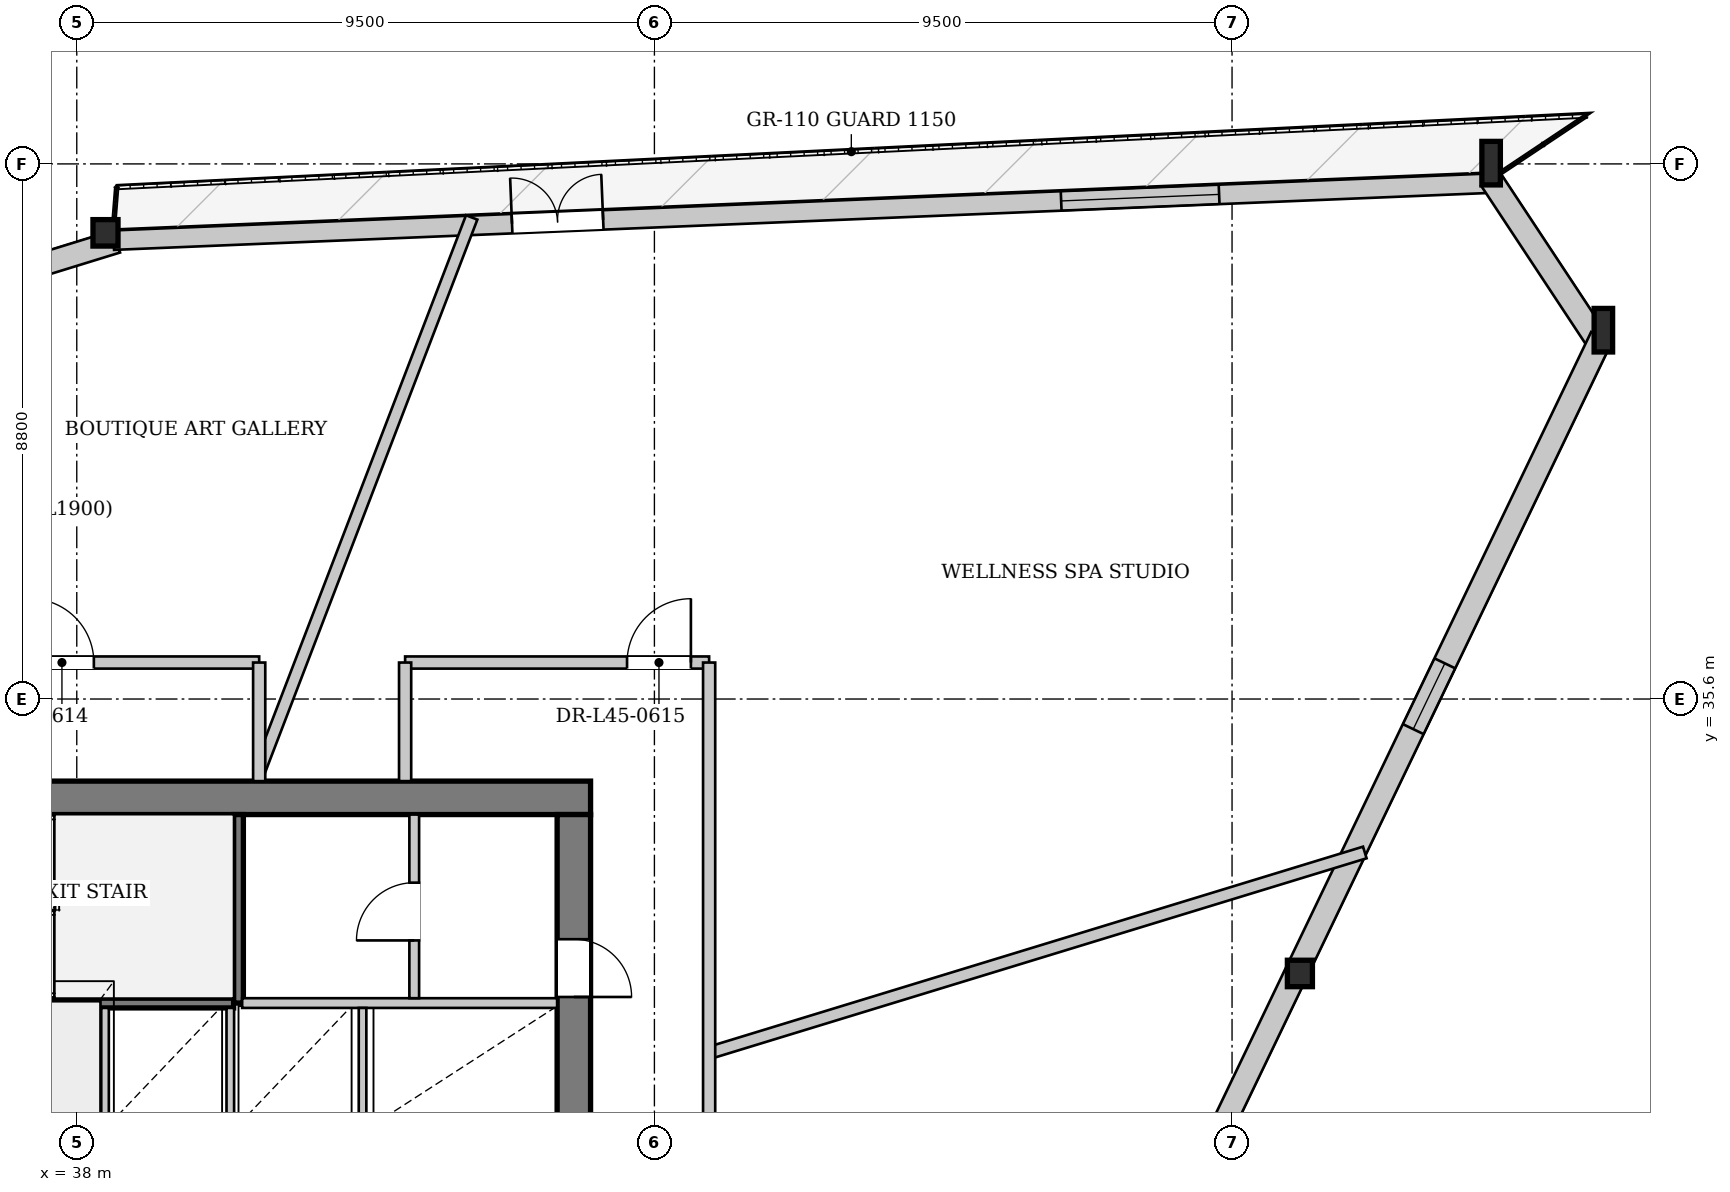
"""IFC4 building model, lengths in metres.
Left out: names, types, materials, properties, quantities, classifications, styles, units other than length and angle.
Written with IfcOpenShell. Run it as: python <this file> out.ifc"""

import sys

from ifc_helpers import new_model, si_unit, direction, frame, frame_2d, origin, origin_2d, place, context, subcontext, project, spatial, rectangle, i_section, extrude, source, transform, mapped, element, fill, save


model = new_model("IFC4")
c1 = context("Model", 3, precision=1e-05, world=origin(), true_north=direction((0.0, 1.0)))
c2 = subcontext(c1, "Body", "Model", "MODEL_VIEW")
j1 = project(units=[si_unit("LENGTHUNIT", "METRE"), si_unit("PLANEANGLEUNIT", "RADIAN")], contexts=[c1])
p1 = place(None, origin())
s1 = spatial("IfcSite", under=j1, at=p1, CompositionType="ELEMENT")
p2 = place(p1, origin())
s2 = spatial("IfcBuilding", under=s1, at=p2, CompositionType="ELEMENT")
p3 = place(p2, frame((0.0, 0.0, 171.45)))
s3 = spatial("IfcBuildingStorey", under=s2, at=p3, CompositionType="ELEMENT", Elevation=171.45)
m1 = source(origin(), c2, "Body", "SweptSolid", [
    extrude(i_section(OverallWidth=0.304, OverallDepth=0.716, WebThickness=0.021, FlangeThickness=0.04, at=origin_2d()), origin(), (0.0, 0.0, 1.0), 3.419),
])
p4 = place(p3, frame((63.249, 41.473, 0.0), z_axis=(-0.082983372602, 0.112691705651, 0.99015874452), x_axis=(-0.805235363414, -0.592955318306, 0.0)))
e1 = element("IfcColumn", 1, at=p4, inside=s3, PredefinedType="COLUMN", context=c2, shape_type="MappedRepresentation", body=[
    mapped(m1, transform((0.0, 0.0, 0.0), x_axis=(1.0, 0.0, 0.0), y_axis=(0.0, 1.0, 0.0), z_axis=(0.0, 0.0, 1.0), scale=1.0)),
])
m2 = source(origin(), c2, "Body", "SweptSolid", [
    extrude(i_section(OverallWidth=0.304, OverallDepth=0.716, WebThickness=0.021, FlangeThickness=0.04, at=origin_2d()), origin(), (0.0, 0.0, 1.0), 3.414),
])
p5 = place(p3, frame((61.414, 44.25, 0.0), z_axis=(-0.089455445649, 0.095033003411, 0.991446645819), x_axis=(-0.728151735963, -0.685415968164, 0.0)))
e2 = element("IfcColumn", 2, at=p5, inside=s3, PredefinedType="COLUMN", context=c2, shape_type="MappedRepresentation", body=[
    mapped(m2, transform((0.0, 0.0, 0.0), x_axis=(1.0, 0.0, 0.0), y_axis=(0.0, 1.0, 0.0), z_axis=(0.0, 0.0, 1.0), scale=1.0)),
])
m3 = source(origin(), c2, "Body", "SweptSolid", [
    extrude(i_section(OverallWidth=0.412, OverallDepth=0.435, WebThickness=0.031, FlangeThickness=0.05, at=origin_2d()), origin(), (0.0, 0.0, 1.0), 3.396),
])
p6 = place(p3, frame((38.6, 43.306, 0.0), z_axis=(-0.075279188452, -0.023223665587, 0.99689202281), x_axis=(0.29479123516, -0.955561681773, 0.0)))
e3 = element("IfcColumn", 3, at=p6, inside=s3, PredefinedType="COLUMN", context=c2, shape_type="MappedRepresentation", body=[
    mapped(m3, transform((0.0, 0.0, 0.0), x_axis=(1.0, 0.0, 0.0), y_axis=(0.0, 1.0, 0.0), z_axis=(0.0, 0.0, 1.0), scale=1.0)),
])
m4 = source(origin(), c2, "Body", "SweptSolid", [
    extrude(i_section(OverallWidth=0.412, OverallDepth=0.435, WebThickness=0.031, FlangeThickness=0.05, at=origin_2d()), origin(), (0.0, 0.0, 1.0), 3.404),
])
p7 = place(p3, frame((58.182, 30.921, 0.0), z_axis=(-0.038804856025, 0.0971914601, 0.994508925668), x_axis=(-0.928712846652, -0.370799741726, 0.0)))
e4 = element("IfcColumn", 4, at=p7, inside=s3, PredefinedType="COLUMN", context=c2, shape_type="MappedRepresentation", body=[
    mapped(m4, transform((0.0, 0.0, 0.0), x_axis=(1.0, 0.0, 0.0), y_axis=(0.0, 1.0, 0.0), z_axis=(0.0, 0.0, 1.0), scale=1.0)),
])
p8 = place(p3, frame((16.837, 36.396, 0.0), z_axis=(0.0, 0.0, 1.0), x_axis=(0.955604756782, 0.294651571887, 0.0)))
e5 = element("IfcWall", 5, at=p8, inside=s3, PredefinedType="SOLIDWALL", context=c2, shape_type="SweptSolid", body=[
    extrude(rectangle(XDim=22.833, YDim=0.38, at=frame_2d((11.417, 0.0))), origin(), (0.0, 0.0, 1.0), 2.722),
])
p9 = place(p8, frame((5.793, 0.0, 0.65)))
e6 = element("IfcOpeningElement", 6, at=p9, cuts=e5, PredefinedType="OPENING", context=c2, shape_type="SweptSolid", body=[
    extrude(rectangle(XDim=1.2, YDim=1.5, at=frame_2d((0.6, 0.75))), frame((0.0, 0.2, 0.0), z_axis=(0.0, -1.0, 0.0), x_axis=(1.0, 0.0, 0.0)), (0.0, 0.0, 1.0), 0.4),
])
p10 = place(p8, frame((16.59, 0.0, 0.65)))
e7 = element("IfcOpeningElement", 7, at=p10, cuts=e5, PredefinedType="OPENING", context=c2, shape_type="SweptSolid", body=[
    extrude(rectangle(XDim=1.2, YDim=1.5, at=frame_2d((0.6, 0.75))), frame((0.0, 0.2, 0.0), z_axis=(0.0, -1.0, 0.0), x_axis=(1.0, 0.0, 0.0)), (0.0, 0.0, 1.0), 0.4),
])
p11 = place(p3, frame((38.607, 43.146, 0.0), z_axis=(0.0, 0.0, 1.0), x_axis=(0.999144377046, 0.041358358487, 0.0)))
e8 = element("IfcWall", 8, at=p11, inside=s3, PredefinedType="SOLIDWALL", context=c2, shape_type="SweptSolid", body=[
    extrude(rectangle(XDim=22.833, YDim=0.32, at=frame_2d((11.417, 0.0))), origin(), (0.0, 0.0, 1.0), 2.722),
])
p12 = place(p11, frame((6.557, 0.0, 0.0)))
e9 = element("IfcOpeningElement", 9, at=p12, cuts=e8, PredefinedType="OPENING", context=c2, shape_type="SweptSolid", body=[
    extrude(rectangle(XDim=1.5, YDim=2.3, at=frame_2d((0.75, 1.15))), frame((0.0, 0.17, 0.0), z_axis=(0.0, -1.0, 0.0), x_axis=(1.0, 0.0, 0.0)), (0.0, 0.0, 1.0), 0.34),
])
p13 = place(p11, frame((15.596, 0.0, 0.252)))
e10 = element("IfcOpeningElement", 10, at=p13, cuts=e8, PredefinedType="OPENING", context=c2, shape_type="SweptSolid", body=[
    extrude(rectangle(XDim=2.6, YDim=2.35, at=frame_2d((1.3, 1.175))), frame((0.0, 0.17, 0.0), z_axis=(0.0, -1.0, 0.0), x_axis=(1.0, 0.0, 0.0)), (0.0, 0.0, 1.0), 0.34),
])
p14 = place(p3, frame((61.255, 44.146, 0.0), z_axis=(0.0, 0.0, 1.0), x_axis=(0.551208947665, -0.834367242894, 0.0)))
e11 = element("IfcWall", 11, at=p14, inside=s3, PredefinedType="SOLIDWALL", context=c2, shape_type="SweptSolid", body=[
    extrude(rectangle(XDim=3.329, YDim=0.38, at=frame_2d((1.665, 0.0))), origin(), (0.0, 0.0, 1.0), 2.722),
])
p15 = place(p3, frame((63.077, 41.555, 0.0), z_axis=(0.0, 0.0, 1.0), x_axis=(-0.432876854569, -0.901453065211, 0.0)))
e12 = element("IfcWall", 12, at=p15, inside=s3, PredefinedType="SOLIDWALL", context=c2, shape_type="SweptSolid", body=[
    extrude(rectangle(XDim=23.409, YDim=0.38, at=frame_2d((11.705, 0.0))), origin(), (0.0, 0.0, 1.0), 2.722),
])
p16 = place(p15, frame((5.955, 0.0, 0.65)))
e13 = element("IfcOpeningElement", 13, at=p16, cuts=e12, PredefinedType="OPENING", context=c2, shape_type="SweptSolid", body=[
    extrude(rectangle(XDim=1.2, YDim=1.5, at=frame_2d((0.6, 0.75))), frame((0.0, 0.2, 0.0), z_axis=(0.0, -1.0, 0.0), x_axis=(1.0, 0.0, 0.0)), (0.0, 0.0, 1.0), 0.4),
])
p17 = place(p15, frame((16.255, 0.0, 0.65)))
e14 = element("IfcOpeningElement", 14, at=p17, cuts=e12, PredefinedType="OPENING", context=c2, shape_type="SweptSolid", body=[
    extrude(rectangle(XDim=1.2, YDim=1.5, at=frame_2d((0.6, 0.75))), frame((0.0, 0.2, 0.0), z_axis=(0.0, -1.0, 0.0), x_axis=(1.0, 0.0, 0.0)), (0.0, 0.0, 1.0), 0.4),
])
p18 = place(p3, frame((29.55, 33.975, 0.0), z_axis=(0.0, 0.0, 1.0), x_axis=(1.0, 0.0, 0.0)))
e15 = element("IfcWall", 15, at=p18, inside=s3, PredefinedType="SHEAR", context=c2, shape_type="SweptSolid", body=[
    extrude(rectangle(XDim=16.9, YDim=0.55, at=frame_2d((8.45, 0.0))), origin(), (0.0, 0.0, 1.0), 3.33),
])
p19 = place(p18, frame((1.55, 0.0, 0.0)))
e16 = element("IfcOpeningElement", 16, at=p19, cuts=e15, PredefinedType="OPENING", context=c2, shape_type="SweptSolid", body=[
    extrude(rectangle(XDim=0.95, YDim=2.1, at=frame_2d((0.475, 1.05))), frame((0.0, 0.285, 0.0), z_axis=(0.0, -1.0, 0.0), x_axis=(1.0, 0.0, 0.0)), (0.0, 0.0, 1.0), 0.57),
])
p20 = place(p18, frame((3.93, 0.0, 0.0)))
e17 = element("IfcOpeningElement", 17, at=p20, cuts=e15, PredefinedType="OPENING", context=c2, shape_type="SweptSolid", body=[
    extrude(rectangle(XDim=1.32, YDim=2.2, at=frame_2d((0.66, 1.1))), frame((0.0, 0.285, 0.0), z_axis=(0.0, -1.0, 0.0), x_axis=(1.0, 0.0, 0.0)), (0.0, 0.0, 1.0), 0.57),
])
p21 = place(p3, frame((46.175, 33.7, 0.0), z_axis=(0.0, 0.0, 1.0), x_axis=(0.0, -1.0, 0.0)))
e18 = element("IfcWall", 18, at=p21, inside=s3, PredefinedType="SHEAR", context=c2, shape_type="SweptSolid", body=[
    extrude(rectangle(XDim=14.2, YDim=0.55, at=frame_2d((7.1, 0.0))), origin(), (0.0, 0.0, 1.0), 3.33),
])
p22 = place(p21, frame((5.18, 0.0, 0.0)))
e19 = element("IfcOpeningElement", 19, at=p22, cuts=e18, PredefinedType="OPENING", context=c2, shape_type="SweptSolid", body=[
    extrude(rectangle(XDim=1.6, YDim=2.2, at=frame_2d((0.8, 1.1))), frame((0.0, 0.285, 0.0), z_axis=(0.0, -1.0, 0.0), x_axis=(1.0, 0.0, 0.0)), (0.0, 0.0, 1.0), 0.57),
])
p23 = place(p21, frame((2.05, 0.0, 0.0)))
e20 = element("IfcOpeningElement", 20, at=p23, cuts=e18, PredefinedType="OPENING", context=c2, shape_type="SweptSolid", body=[
    extrude(rectangle(XDim=0.95, YDim=2.1, at=frame_2d((0.475, 1.05))), frame((0.0, 0.285, 0.0), z_axis=(0.0, -1.0, 0.0), x_axis=(1.0, 0.0, 0.0)), (0.0, 0.0, 1.0), 0.57),
])
p24 = place(p3, frame((33.28, 30.6, 0.0), z_axis=(0.0, 0.0, 1.0), x_axis=(1.0, 0.0, 0.0)))
e21 = element("IfcWall", 21, at=p24, inside=s3, PredefinedType="PARTITIONING", context=c2, shape_type="SweptSolid", body=[
    extrude(rectangle(XDim=7.3, YDim=0.16, at=frame_2d((3.65, 0.0))), origin(), (0.0, 0.0, 1.0), 3.33),
])
p25 = place(p3, frame((40.66, 30.6, 0.0), z_axis=(0.0, 0.0, 1.0), x_axis=(0.0, 1.0, 0.0)))
e22 = element("IfcWall", 22, at=p25, inside=s3, PredefinedType="PARTITIONING", context=c2, shape_type="SweptSolid", body=[
    extrude(rectangle(XDim=3.1, YDim=0.16, at=frame_2d((1.55, 0.0))), origin(), (0.0, 0.0, 1.0), 3.33),
])
p26 = place(p3, frame((40.72, 30.6, 0.0), z_axis=(0.0, 0.0, 1.0), x_axis=(1.0, 0.0, 0.0)))
e23 = element("IfcWall", 23, at=p26, inside=s3, PredefinedType="PARTITIONING", context=c2, shape_type="SweptSolid", body=[
    extrude(rectangle(XDim=5.18, YDim=0.16, at=frame_2d((2.59, 0.0))), origin(), (0.0, 0.0, 1.0), 3.33),
])
for number, where, z_axis, x_axis in (
    (24, (38.465, 28.6, 0.0), (0.0, 0.0, 1.0), (0.0, 1.0, 0.0)),
    (25, (40.525, 28.6, 0.0), (0.0, 0.0, 1.0), (0.0, 1.0, 0.0)),
    (26, (42.7, 28.6, 0.0), (0.0, 0.0, 1.0), (0.0, 1.0, 0.0)),
):
    element("IfcWall", number, at=place(p3, frame(where, z_axis=z_axis, x_axis=x_axis)), inside=s3, PredefinedType="PARTITIONING", context=c2, shape_type="SweptSolid", body=[
        extrude(rectangle(XDim=1.92, YDim=0.125, at=frame_2d((0.96, 0.0))), origin(), (0.0, 0.0, 1.0), 3.33),
    ])
p27 = place(p3, frame((43.55, 30.68, 0.0), z_axis=(0.0, 0.0, 1.0), x_axis=(0.0, 1.0, 0.0)))
e27 = element("IfcWall", 27, at=p27, inside=s3, PredefinedType="PARTITIONING", context=c2, shape_type="SweptSolid", body=[
    extrude(rectangle(XDim=3.02, YDim=0.16, at=frame_2d((1.51, 0.0))), origin(), (0.0, 0.0, 1.0), 3.33),
])
p28 = place(p27, frame((0.95, 0.0, 0.0)))
e28 = element("IfcOpeningElement", 28, at=p28, cuts=e27, PredefinedType="OPENING", context=c2, shape_type="SweptSolid", body=[
    extrude(rectangle(XDim=0.95, YDim=2.1, at=frame_2d((0.475, 1.05))), frame((0.0, 0.09, 0.0), z_axis=(0.0, -1.0, 0.0), x_axis=(1.0, 0.0, 0.0)), (0.0, 0.0, 1.0), 0.18),
])
p29 = place(p3, frame((48.4, 29.78, 0.0), z_axis=(0.0, 0.0, 1.0), x_axis=(0.956305507795, 0.29236924558, 0.0)))
e29 = element("IfcWall", 29, at=p29, inside=s3, PredefinedType="PARTITIONING", context=c2, shape_type="SweptSolid", body=[
    extrude(rectangle(XDim=11.276, YDim=0.2, at=frame_2d((5.638, 0.0))), origin(), (0.0, 0.0, 1.0), 3.33),
])
p30 = place(p3, frame((41.0, 34.415, 0.0), z_axis=(0.0, 0.0, 1.0), x_axis=(0.358366692875, 0.933580908887, 0.0)))
e30 = element("IfcWall", 30, at=p30, inside=s3, PredefinedType="PARTITIONING", context=c2, shape_type="SweptSolid", body=[
    extrude(rectangle(XDim=9.752, YDim=0.2, at=frame_2d((4.876, 0.0))), origin(), (0.0, 0.0, 1.0), 3.33),
])
p31 = place(p3, frame((27.6, 36.2, 0.0), z_axis=(0.0, 0.0, 1.0), x_axis=(1.0, 0.0, 0.0)))
e31 = element("IfcWall", 31, at=p31, inside=s3, PredefinedType="PARTITIONING", context=c2, shape_type="SweptSolid", body=[
    extrude(rectangle(XDim=13.4, YDim=0.2, at=frame_2d((6.7, 0.0))), origin(), (0.0, 0.0, 1.0), 3.33),
])
p32 = place(p31, frame((9.631, 0.0, 0.0)))
e32 = element("IfcOpeningElement", 32, at=p32, cuts=e31, PredefinedType="OPENING", context=c2, shape_type="SweptSolid", body=[
    extrude(rectangle(XDim=1.05, YDim=2.2, at=frame_2d((0.525, 1.1))), frame((0.0, 0.11, 0.0), z_axis=(0.0, -1.0, 0.0), x_axis=(1.0, 0.0, 0.0)), (0.0, 0.0, 1.0), 0.22),
])
p33 = place(p3, frame((41.0, 34.25, 0.0), z_axis=(0.0, 0.0, 1.0), x_axis=(0.0, 1.0, 0.0)))
e33 = element("IfcWall", 33, at=p33, inside=s3, PredefinedType="PARTITIONING", context=c2, shape_type="SweptSolid", body=[
    extrude(rectangle(XDim=1.95, YDim=0.2, at=frame_2d((0.975, 0.0))), origin(), (0.0, 0.0, 1.0), 3.33),
])
p34 = place(p3, frame((43.4, 36.2, 0.0), z_axis=(0.0, 0.0, 1.0), x_axis=(1.0, 0.0, 0.0)))
e34 = element("IfcWall", 34, at=p34, inside=s3, PredefinedType="PARTITIONING", context=c2, shape_type="SweptSolid", body=[
    extrude(rectangle(XDim=5.0, YDim=0.2, at=frame_2d((2.5, 0.0))), origin(), (0.0, 0.0, 1.0), 3.33),
])
p35 = place(p34, frame((3.65, 0.0, 0.0)))
e35 = element("IfcOpeningElement", 35, at=p35, cuts=e34, PredefinedType="OPENING", context=c2, shape_type="SweptSolid", body=[
    extrude(rectangle(XDim=1.05, YDim=2.2, at=frame_2d((0.525, 1.1))), frame((0.0, 0.11, 0.0), z_axis=(0.0, -1.0, 0.0), x_axis=(1.0, 0.0, 0.0)), (0.0, 0.0, 1.0), 0.22),
])
p36 = place(p3, frame((43.4, 34.25, 0.0), z_axis=(0.0, 0.0, 1.0), x_axis=(0.0, 1.0, 0.0)))
e36 = element("IfcWall", 36, at=p36, inside=s3, PredefinedType="PARTITIONING", context=c2, shape_type="SweptSolid", body=[
    extrude(rectangle(XDim=1.95, YDim=0.2, at=frame_2d((0.975, 0.0))), origin(), (0.0, 0.0, 1.0), 3.33),
])
p37 = place(p3, frame((48.4, 17.0, 0.0), z_axis=(0.0, 0.0, 1.0), x_axis=(0.0, 1.0, 0.0)))
e37 = element("IfcWall", 37, at=p37, inside=s3, PredefinedType="PARTITIONING", context=c2, shape_type="SweptSolid", body=[
    extrude(rectangle(XDim=19.2, YDim=0.2, at=frame_2d((9.6, 0.0))), origin(), (0.0, 0.0, 1.0), 3.33),
])
p38 = place(p37, frame((8.665, 0.0, 0.0)))
e38 = element("IfcOpeningElement", 38, at=p38, cuts=e37, PredefinedType="OPENING", context=c2, shape_type="SweptSolid", body=[
    extrude(rectangle(XDim=1.05, YDim=2.2, at=frame_2d((0.525, 1.1))), frame((0.0, 0.11, 0.0), z_axis=(0.0, -1.0, 0.0), x_axis=(1.0, 0.0, 0.0)), (0.0, 0.0, 1.0), 0.22),
])
m5 = source(origin(), c2, "Body", "SweptSolid", [
    extrude(rectangle(XDim=1.5, YDim=2.3, at=frame_2d((0.75, 1.15))), frame((0.0, 0.025, 0.0), z_axis=(0.0, -1.0, 0.0), x_axis=(1.0, 0.0, 0.0)), (0.0, 0.0, 1.0), 0.05),
])
p39 = place(p12, origin())
e39 = element("IfcDoor", 39, at=p39, inside=s3, OperationType="DOUBLE_DOOR_SINGLE_SWING", PredefinedType="DOOR", context=c2, shape_type="MappedRepresentation", body=[
    mapped(m5, transform((0.0, 0.0, 0.0), x_axis=(1.0, 0.0, 0.0), y_axis=(0.0, 1.0, 0.0), z_axis=(0.0, 0.0, 1.0), scale=1.0)),
])
fill(e9, e39)
m6 = source(origin(), c2, "Body", "SweptSolid", [
    extrude(rectangle(XDim=2.6, YDim=2.35, at=frame_2d((1.3, 1.175))), frame((0.0, 0.03, 0.0), z_axis=(0.0, -1.0, 0.0), x_axis=(1.0, 0.0, 0.0)), (0.0, 0.0, 1.0), 0.06),
])
p40 = place(p13, origin())
e40 = element("IfcWindow", 40, at=p40, inside=s3, PartitioningType="SINGLE_PANEL", PredefinedType="WINDOW", context=c2, shape_type="MappedRepresentation", body=[
    mapped(m6, transform((0.0, 0.0, 0.0), x_axis=(1.0, 0.0, 0.0), y_axis=(0.0, 1.0, 0.0), z_axis=(0.0, 0.0, 1.0), scale=1.0)),
])
fill(e10, e40)
m7 = source(origin(), c2, "Body", "SweptSolid", [
    extrude(rectangle(XDim=1.2, YDim=1.5, at=frame_2d((0.6, 0.75))), frame((0.0, 0.03, 0.0), z_axis=(0.0, -1.0, 0.0), x_axis=(1.0, 0.0, 0.0)), (0.0, 0.0, 1.0), 0.06),
])
p41 = place(p16, origin())
e41 = element("IfcWindow", 41, at=p41, inside=s3, PartitioningType="SINGLE_PANEL", PredefinedType="WINDOW", context=c2, shape_type="MappedRepresentation", body=[
    mapped(m7, transform((0.0, 0.0, 0.0), x_axis=(1.0, 0.0, 0.0), y_axis=(0.0, 1.0, 0.0), z_axis=(0.0, 0.0, 1.0), scale=1.0)),
])
fill(e13, e41)
m8 = source(origin(), c2, "Body", "SweptSolid", [
    extrude(rectangle(XDim=0.95, YDim=2.1, at=frame_2d((0.475, 1.05))), frame((0.0, 0.025, 0.0), z_axis=(0.0, -1.0, 0.0), x_axis=(1.0, 0.0, 0.0)), (0.0, 0.0, 1.0), 0.05),
])
p42 = place(p28, origin())
e42 = element("IfcDoor", 42, at=p42, inside=s3, OperationType="SINGLE_SWING_LEFT", PredefinedType="DOOR", context=c2, shape_type="MappedRepresentation", body=[
    mapped(m8, transform((0.0, 0.0, 0.0), x_axis=(1.0, 0.0, 0.0), y_axis=(0.0, 1.0, 0.0), z_axis=(0.0, 0.0, 1.0), scale=1.0)),
])
fill(e28, e42)
p43 = place(p23, origin())
e43 = element("IfcDoor", 43, at=p43, inside=s3, OperationType="SINGLE_SWING_RIGHT", PredefinedType="DOOR", context=c2, shape_type="MappedRepresentation", body=[
    mapped(m8, transform((0.0, 0.0, 0.0), x_axis=(1.0, 0.0, 0.0), y_axis=(0.0, 1.0, 0.0), z_axis=(0.0, 0.0, 1.0), scale=1.0)),
])
fill(e20, e43)
m9 = source(origin(), c2, "Body", "SweptSolid", [
    extrude(rectangle(XDim=1.05, YDim=2.2, at=frame_2d((0.525, 1.1))), frame((0.0, 0.025, 0.0), z_axis=(0.0, -1.0, 0.0), x_axis=(1.0, 0.0, 0.0)), (0.0, 0.0, 1.0), 0.05),
])
p44 = place(p32, origin())
e44 = element("IfcDoor", 44, at=p44, inside=s3, OperationType="SINGLE_SWING_LEFT", PredefinedType="DOOR", context=c2, shape_type="MappedRepresentation", body=[
    mapped(m9, transform((0.0, 0.0, 0.0), x_axis=(1.0, 0.0, 0.0), y_axis=(0.0, 1.0, 0.0), z_axis=(0.0, 0.0, 1.0), scale=1.0)),
])
fill(e32, e44)
p45 = place(p35, origin())
e45 = element("IfcDoor", 45, at=p45, inside=s3, OperationType="SINGLE_SWING_RIGHT", PredefinedType="DOOR", context=c2, shape_type="MappedRepresentation", body=[
    mapped(m9, transform((0.0, 0.0, 0.0), x_axis=(1.0, 0.0, 0.0), y_axis=(0.0, 1.0, 0.0), z_axis=(0.0, 0.0, 1.0), scale=1.0)),
])
fill(e35, e45)
save(model, sys.argv[1])
